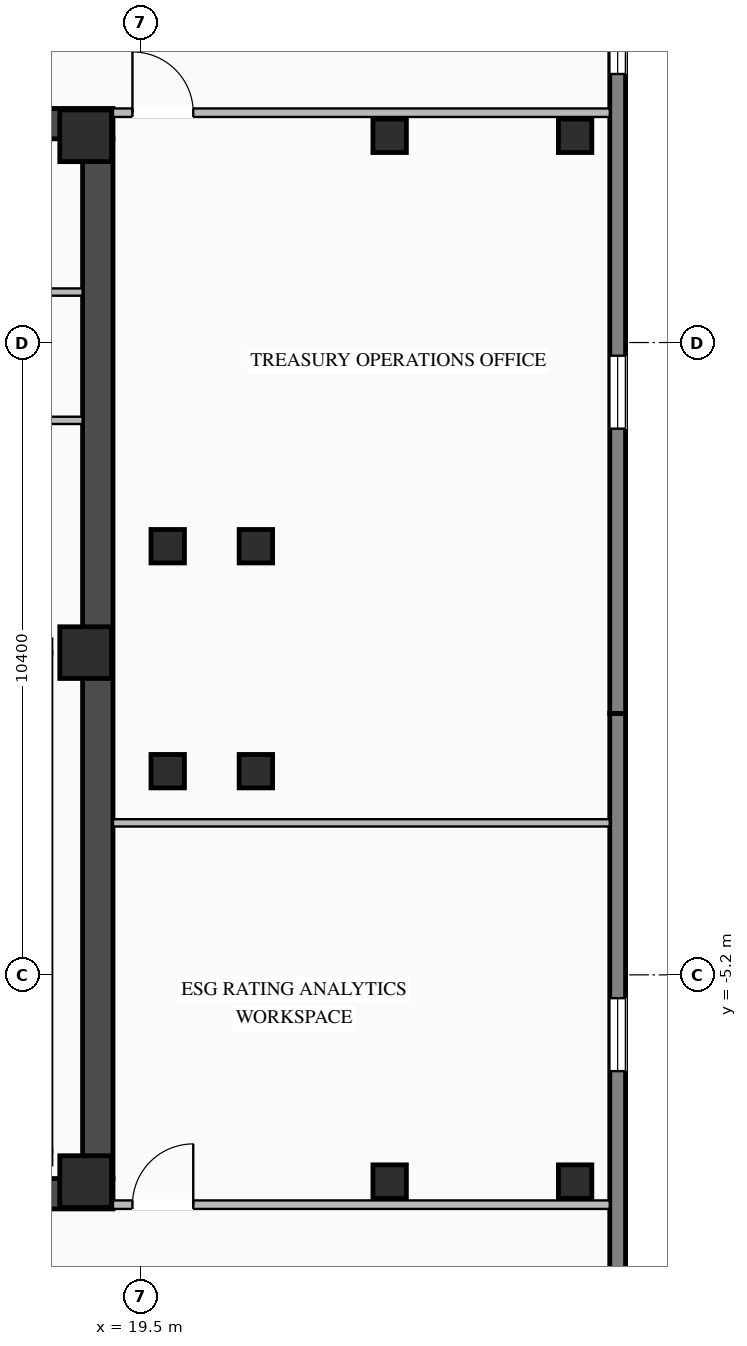
"""IFC4 building model, lengths in metres.
Left out: names, types, materials, properties, quantities, classifications, styles, units other than length and angle.
Written with IfcOpenShell. Run it as: python <this file> out.ifc"""

import sys

from ifc_helpers import new_model, si_unit, direction, frame, frame_2d, origin, origin_2d, place, context, subcontext, project, spatial, rectangle, i_section, extrude, element, fill, save


model = new_model("IFC4")
c1 = context("Model", 3, precision=1e-05, world=origin(), true_north=direction((0.0, 1.0)))
c2 = subcontext(c1, "Body", "Model", "MODEL_VIEW")
j1 = project(units=[si_unit("LENGTHUNIT", "METRE"), si_unit("PLANEANGLEUNIT", "RADIAN")], contexts=[c1])
p1 = place(None, origin())
s1 = spatial("IfcSite", under=j1, at=p1, CompositionType="ELEMENT")
p2 = place(p1, origin())
s2 = spatial("IfcBuilding", under=s1, at=p2, CompositionType="ELEMENT")
p3 = place(p2, frame((0.0, 0.0, 208.5)))
s3 = spatial("IfcBuildingStorey", under=s2, at=p3, CompositionType="ELEMENT", Elevation=208.5)
p4 = place(p3, frame((8.8, -8.8, 0.0), z_axis=(0.0, 0.0, 1.0), x_axis=(1.0, 0.0, 0.0)))
e1 = element("IfcWall", 1, at=p4, inside=s3, PredefinedType="SHEAR", context=c2, shape_type="SweptSolid", body=[
    extrude(rectangle(XDim=10.25, YDim=0.5, at=frame_2d((5.125, 0.0))), origin(), (0.0, 0.0, 1.0), 3.27),
])
p5 = place(p3, frame((8.8, 8.8, 0.0), z_axis=(0.0, 0.0, 1.0), x_axis=(1.0, 0.0, 0.0)))
e2 = element("IfcWall", 2, at=p5, inside=s3, PredefinedType="SHEAR", context=c2, shape_type="SweptSolid", body=[
    extrude(rectangle(XDim=10.25, YDim=0.5, at=frame_2d((5.125, 0.0))), origin(), (0.0, 0.0, 1.0), 3.27),
])
p6 = place(p5, frame((3.25, 0.0, 0.0)))
e3 = element("IfcOpeningElement", 3, at=p6, cuts=e2, PredefinedType="OPENING", context=c2, shape_type="SweptSolid", body=[
    extrude(rectangle(XDim=1.4, YDim=2.05, at=frame_2d((0.7, 1.025))), frame((0.0, 0.26, 0.0), z_axis=(0.0, -1.0, 0.0), x_axis=(1.0, 0.0, 0.0)), (0.0, 0.0, 1.0), 0.52),
])
p7 = place(p3, frame((18.8, -8.55, 0.0), z_axis=(0.0, 0.0, 1.0), x_axis=(0.0, 1.0, 0.0)))
e4 = element("IfcWall", 4, at=p7, inside=s3, PredefinedType="SHEAR", context=c2, shape_type="SweptSolid", body=[
    extrude(rectangle(XDim=17.1, YDim=0.5, at=frame_2d((8.55, 0.0))), origin(), (0.0, 0.0, 1.0), 3.27),
])
for number, where, z_axis, x_axis in (
    (5, (18.6, -8.6, 0.0), (0.0, 0.0, 1.0), (1.0, 0.0, 0.0)),
    (6, (18.6, 0.1, 0.0), (0.0, 0.0, 1.0), (1.0, 0.0, 0.0)),
    (7, (18.6, 8.6, 0.0), (0.0, 0.0, 1.0), (1.0, 0.0, 0.0)),
):
    element("IfcColumn", number, at=place(p3, frame(where, z_axis=z_axis, x_axis=x_axis)), inside=s3, PredefinedType="COLUMN", context=c2, shape_type="SweptSolid", body=[
        extrude(rectangle(XDim=0.85, YDim=0.85, at=origin_2d()), origin(), (0.0, 0.0, 1.0), 3.45),
    ])
for number, where, z_axis, x_axis in (
    (8, (19.95, -1.85, 0.0), (0.0, 0.0, 1.0), (1.0, 0.0, 0.0)),
    (9, (19.95, 1.85, 0.0), (0.0, 0.0, 1.0), (1.0, 0.0, 0.0)),
    (10, (21.4, -1.85, 0.0), (0.0, 0.0, 1.0), (1.0, 0.0, 0.0)),
    (11, (21.4, 1.85, 0.0), (0.0, 0.0, 1.0), (1.0, 0.0, 0.0)),
    (12, (23.6, -8.6, 0.0), (0.0, 0.0, 1.0), (1.0, 0.0, 0.0)),
    (13, (23.6, 8.6, 0.0), (0.0, 0.0, 1.0), (1.0, 0.0, 0.0)),
    (14, (26.65, -8.6, 0.0), (0.0, 0.0, 1.0), (1.0, 0.0, 0.0)),
    (15, (26.65, 8.6, 0.0), (0.0, 0.0, 1.0), (1.0, 0.0, 0.0)),
):
    element("IfcColumn", number, at=place(p3, frame(where, z_axis=z_axis, x_axis=x_axis)), inside=s3, PredefinedType="COLUMN", context=c2, shape_type="SweptSolid", body=[
        extrude(i_section(OverallWidth=0.55, OverallDepth=0.55, WebThickness=0.024, FlangeThickness=0.036, at=origin_2d()), origin(), (0.0, 0.0, 1.0), 3.45),
    ])
p8 = place(p3, frame((27.35, -0.9, 0.0), z_axis=(0.0, 0.0, 1.0), x_axis=(0.0, -1.0, 0.0)))
e16 = element("IfcWall", 16, at=p8, inside=s3, PredefinedType="STANDARD", context=c2, shape_type="SweptSolid", body=[
    extrude(rectangle(XDim=15.85, YDim=0.26, at=frame_2d((7.925, 0.0))), origin(), (0.0, 0.0, 1.0), 3.25),
])
p9 = place(p8, frame((4.683, 0.0, 0.76)))
e17 = element("IfcOpeningElement", 17, at=p9, cuts=e16, PredefinedType="OPENING", context=c2, shape_type="SweptSolid", body=[
    extrude(rectangle(XDim=1.2, YDim=1.95, at=frame_2d((0.6, 0.975))), frame((0.0, 0.14, 0.0), z_axis=(0.0, -1.0, 0.0), x_axis=(1.0, 0.0, 0.0)), (0.0, 0.0, 1.0), 0.28),
])
p10 = place(p8, frame((10.517, 0.0, 0.76)))
e18 = element("IfcOpeningElement", 18, at=p10, cuts=e16, PredefinedType="OPENING", context=c2, shape_type="SweptSolid", body=[
    extrude(rectangle(XDim=1.2, YDim=1.95, at=frame_2d((0.6, 0.975))), frame((0.0, 0.14, 0.0), z_axis=(0.0, -1.0, 0.0), x_axis=(1.0, 0.0, 0.0)), (0.0, 0.0, 1.0), 0.28),
])
p11 = place(p3, frame((27.35, 14.95, 0.0), z_axis=(0.0, 0.0, 1.0), x_axis=(0.0, -1.0, 0.0)))
e19 = element("IfcWall", 19, at=p11, inside=s3, PredefinedType="STANDARD", context=c2, shape_type="SweptSolid", body=[
    extrude(rectangle(XDim=15.85, YDim=0.26, at=frame_2d((7.925, 0.0))), origin(), (0.0, 0.0, 1.0), 3.25),
])
p12 = place(p11, frame((4.133, 0.0, 0.76)))
e20 = element("IfcOpeningElement", 20, at=p12, cuts=e19, PredefinedType="OPENING", context=c2, shape_type="SweptSolid", body=[
    extrude(rectangle(XDim=1.2, YDim=1.95, at=frame_2d((0.6, 0.975))), frame((0.0, 0.14, 0.0), z_axis=(0.0, -1.0, 0.0), x_axis=(1.0, 0.0, 0.0)), (0.0, 0.0, 1.0), 0.28),
])
p13 = place(p11, frame((9.967, 0.0, 0.76)))
e21 = element("IfcOpeningElement", 21, at=p13, cuts=e19, PredefinedType="OPENING", context=c2, shape_type="SweptSolid", body=[
    extrude(rectangle(XDim=1.2, YDim=1.95, at=frame_2d((0.6, 0.975))), frame((0.0, 0.14, 0.0), z_axis=(0.0, -1.0, 0.0), x_axis=(1.0, 0.0, 0.0)), (0.0, 0.0, 1.0), 0.28),
])
p14 = place(p3, frame((13.9, 3.92, 0.0), z_axis=(0.0, 0.0, 1.0), x_axis=(1.0, 0.0, 0.0)))
e22 = element("IfcWall", 22, at=p14, inside=s3, PredefinedType="STANDARD", context=c2, shape_type="SweptSolid", body=[
    extrude(rectangle(XDim=4.65, YDim=0.12, at=frame_2d((2.325, 0.0))), origin(), (0.0, 0.0, 1.0), 3.25),
])
p15 = place(p3, frame((16.15, 6.03, 0.0), z_axis=(0.0, 0.0, 1.0), x_axis=(1.0, 0.0, 0.0)))
e23 = element("IfcWall", 23, at=p15, inside=s3, PredefinedType="STANDARD", context=c2, shape_type="SweptSolid", body=[
    extrude(rectangle(XDim=2.4, YDim=0.12, at=frame_2d((1.2, 0.0))), origin(), (0.0, 0.0, 1.0), 3.25),
])
p16 = place(p3, frame((19.05, 8.98, 0.0), z_axis=(0.0, 0.0, 1.0), x_axis=(1.0, 0.0, 0.0)))
e24 = element("IfcWall", 24, at=p16, inside=s3, PredefinedType="STANDARD", context=c2, shape_type="SweptSolid", body=[
    extrude(rectangle(XDim=8.17, YDim=0.14, at=frame_2d((4.085, 0.0))), origin(), (0.0, 0.0, 1.0), 3.25),
])
p17 = place(p16, frame((0.32, 0.0, 0.0)))
e25 = element("IfcOpeningElement", 25, at=p17, cuts=e24, PredefinedType="OPENING", context=c2, shape_type="SweptSolid", body=[
    extrude(rectangle(XDim=1.0, YDim=2.08, at=frame_2d((0.5, 1.04))), frame((0.0, 0.08, 0.0), z_axis=(0.0, -1.0, 0.0), x_axis=(1.0, 0.0, 0.0)), (0.0, 0.0, 1.0), 0.16),
])
p18 = place(p3, frame((19.05, -8.98, 0.0), z_axis=(0.0, 0.0, 1.0), x_axis=(1.0, 0.0, 0.0)))
e26 = element("IfcWall", 26, at=p18, inside=s3, PredefinedType="STANDARD", context=c2, shape_type="SweptSolid", body=[
    extrude(rectangle(XDim=8.17, YDim=0.14, at=frame_2d((4.085, 0.0))), origin(), (0.0, 0.0, 1.0), 3.25),
])
p19 = place(p18, frame((0.32, 0.0, 0.0)))
e27 = element("IfcOpeningElement", 27, at=p19, cuts=e26, PredefinedType="OPENING", context=c2, shape_type="SweptSolid", body=[
    extrude(rectangle(XDim=1.0, YDim=2.08, at=frame_2d((0.5, 1.04))), frame((0.0, 0.08, 0.0), z_axis=(0.0, -1.0, 0.0), x_axis=(1.0, 0.0, 0.0)), (0.0, 0.0, 1.0), 0.16),
])
p20 = place(p3, frame((19.05, -2.7, 0.0), z_axis=(0.0, 0.0, 1.0), x_axis=(1.0, 0.0, 0.0)))
e28 = element("IfcWall", 28, at=p20, inside=s3, PredefinedType="STANDARD", context=c2, shape_type="SweptSolid", body=[
    extrude(rectangle(XDim=8.17, YDim=0.12, at=frame_2d((4.085, 0.0))), origin(), (0.0, 0.0, 1.0), 3.25),
])
p21 = place(p9, origin())
e29 = element("IfcWindow", 29, at=p21, inside=s3, PartitioningType="SINGLE_PANEL", PredefinedType="WINDOW", context=c2, shape_type="SweptSolid", body=[
    extrude(rectangle(XDim=1.2, YDim=1.95, at=frame_2d((0.6, 0.975))), frame((0.0, 0.03, 0.0), z_axis=(0.0, -1.0, 0.0), x_axis=(1.0, 0.0, 0.0)), (0.0, 0.0, 1.0), 0.06),
])
fill(e17, e29)
p22 = place(p12, origin())
e30 = element("IfcWindow", 30, at=p22, inside=s3, PartitioningType="SINGLE_PANEL", PredefinedType="WINDOW", context=c2, shape_type="SweptSolid", body=[
    extrude(rectangle(XDim=1.2, YDim=1.95, at=frame_2d((0.6, 0.975))), frame((0.0, 0.03, 0.0), z_axis=(0.0, -1.0, 0.0), x_axis=(1.0, 0.0, 0.0)), (0.0, 0.0, 1.0), 0.06),
])
fill(e20, e30)
p23 = place(p13, origin())
e31 = element("IfcWindow", 31, at=p23, inside=s3, PartitioningType="SINGLE_PANEL", PredefinedType="WINDOW", context=c2, shape_type="SweptSolid", body=[
    extrude(rectangle(XDim=1.2, YDim=1.95, at=frame_2d((0.6, 0.975))), frame((0.0, 0.03, 0.0), z_axis=(0.0, -1.0, 0.0), x_axis=(1.0, 0.0, 0.0)), (0.0, 0.0, 1.0), 0.06),
])
fill(e21, e31)
p24 = place(p17, origin())
e32 = element("IfcDoor", 32, at=p24, inside=s3, OperationType="SINGLE_SWING_LEFT", PredefinedType="DOOR", context=c2, shape_type="SweptSolid", body=[
    extrude(rectangle(XDim=1.0, YDim=2.08, at=frame_2d((0.5, 1.04))), frame((0.0, 0.025, 0.0), z_axis=(0.0, -1.0, 0.0), x_axis=(1.0, 0.0, 0.0)), (0.0, 0.0, 1.0), 0.05),
])
fill(e25, e32)
p25 = place(p19, origin())
e33 = element("IfcDoor", 33, at=p25, inside=s3, OperationType="SINGLE_SWING_RIGHT", PredefinedType="DOOR", context=c2, shape_type="SweptSolid", body=[
    extrude(rectangle(XDim=1.0, YDim=2.08, at=frame_2d((0.5, 1.04))), frame((0.0, 0.025, 0.0), z_axis=(0.0, -1.0, 0.0), x_axis=(1.0, 0.0, 0.0)), (0.0, 0.0, 1.0), 0.05),
])
fill(e27, e33)
save(model, sys.argv[1])
